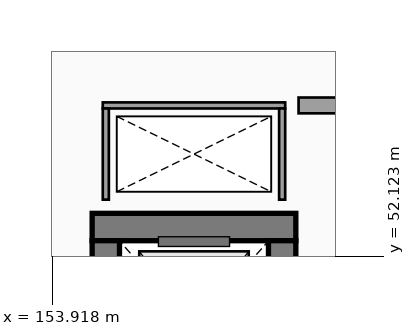
"""IFC4 building model, lengths in metres.
Left out: names, types, materials, properties, quantities, classifications, styles, units other than length and angle.
Written with IfcOpenShell. Run it as: python <this file> out.ifc"""

import sys

from ifc_helpers import new_model, si_unit, direction, frame, frame_2d, origin, place, context, subcontext, project, spatial, rectangle, extrude, element, save


model = new_model("IFC4")
c1 = context("Model", 3, precision=1e-05, world=origin(), true_north=direction((0.0, 1.0)))
c2 = subcontext(c1, "Body", "Model", "MODEL_VIEW")
j1 = project(units=[si_unit("LENGTHUNIT", "METRE"), si_unit("PLANEANGLEUNIT", "RADIAN")], contexts=[c1])
p1 = place(None, origin())
s1 = spatial("IfcSite", under=j1, at=p1, CompositionType="ELEMENT")
p2 = place(p1, origin())
s2 = spatial("IfcBuilding", under=s1, at=p2, CompositionType="ELEMENT")
p3 = place(p2, frame((0.0, 0.0, 9.6)))
s3 = spatial("IfcBuildingStorey", under=s2, at=p3, CompositionType="ELEMENT", Elevation=9.6)
p4 = place(p3, frame((157.925, 52.6, 0.0), z_axis=(0.0, 0.0, 1.0), x_axis=(-1.0, 0.0, 0.0)))
e1 = element("IfcWall", 1, at=p4, inside=s3, PredefinedType="SHEAR", context=c2, shape_type="SweptSolid", body=[
    extrude(rectangle(XDim=3.35, YDim=0.45, at=frame_2d((1.675, 0.0))), origin(), (0.0, 0.0, 1.0), 4.22),
])
p5 = place(p3, frame((154.8, 52.375, 0.0), z_axis=(0.0, 0.0, 1.0), x_axis=(0.0, -1.0, 0.0)))
e2 = element("IfcWall", 2, at=p5, inside=s3, PredefinedType="SHEAR", context=c2, shape_type="SweptSolid", body=[
    extrude(rectangle(XDim=2.75, YDim=0.45, at=frame_2d((1.375, 0.0))), origin(), (0.0, 0.0, 1.0), 4.22),
])
p6 = place(p3, frame((157.7, 49.625, 0.0), z_axis=(0.0, 0.0, 1.0), x_axis=(0.0, 1.0, 0.0)))
e3 = element("IfcWall", 3, at=p6, inside=s3, PredefinedType="SHEAR", context=c2, shape_type="SweptSolid", body=[
    extrude(rectangle(XDim=2.75, YDim=0.45, at=frame_2d((1.375, 0.0))), origin(), (0.0, 0.0, 1.0), 4.22),
])
p7 = place(p6, frame((0.725, 0.0, 0.0), z_axis=(0.0, 0.0, 1.0), x_axis=(1.0, 0.0, 0.0)))
e4 = element("IfcOpeningElement", 4, at=p7, cuts=e3, PredefinedType="OPENING", context=c2, shape_type="SweptSolid", body=[
    extrude(rectangle(XDim=1.3, YDim=2.25, at=frame_2d((0.65, 1.125))), frame((0.0, 0.235, 0.0), z_axis=(0.0, -1.0, 0.0), x_axis=(1.0, 0.0, 0.0)), (0.0, 0.0, 1.0), 0.47),
])
p8 = place(p3, frame((157.75, 54.6, 0.0), z_axis=(0.0, 0.0, 1.0), x_axis=(-1.0, 0.0, 0.0)))
e5 = element("IfcWall", 5, at=p8, inside=s3, PredefinedType="PARTITIONING", context=c2, shape_type="SweptSolid", body=[
    extrude(rectangle(XDim=3.0, YDim=0.1, at=frame_2d((1.5, 0.0))), origin(), (0.0, 0.0, 1.0), 4.22),
])
for number, where, z_axis, x_axis in (
    (6, (154.8, 54.55, 0.0), (0.0, 0.0, 1.0), (0.0, -1.0, 0.0)),
    (7, (157.7, 53.05, 0.0), (0.0, 0.0, 1.0), (0.0, 1.0, 0.0)),
):
    element("IfcWall", number, at=place(p3, frame(where, z_axis=z_axis, x_axis=x_axis)), inside=s3, PredefinedType="PARTITIONING", context=c2, shape_type="SweptSolid", body=[
        extrude(rectangle(XDim=1.5, YDim=0.1, at=frame_2d((0.75, 0.0))), origin(), (0.0, 0.0, 1.0), 4.22),
    ])
p9 = place(p3, frame((161.73, 54.6, 0.0), z_axis=(0.0, 0.0, 1.0), x_axis=(-1.0, 0.0, 0.0)))
e8 = element("IfcWall", 8, at=p9, inside=s3, PredefinedType="SOLIDWALL", context=c2, shape_type="SweptSolid", body=[
    extrude(rectangle(XDim=3.76, YDim=0.26, at=frame_2d((1.88, 0.0))), origin(), (0.0, 0.0, 1.0), 4.22),
])
p10 = place(p9, frame((2.805, 0.0, 0.0), z_axis=(0.0, 0.0, 1.0), x_axis=(-1.0, 0.0, 0.0)))
e9 = element("IfcOpeningElement", 9, at=p10, cuts=e8, PredefinedType="OPENING", context=c2, shape_type="SweptSolid", body=[
    extrude(rectangle(XDim=1.85, YDim=2.25, at=frame_2d((0.925, 1.125))), frame((0.0, 0.14, 0.0), z_axis=(0.0, -1.0, 0.0), x_axis=(1.0, 0.0, 0.0)), (0.0, 0.0, 1.0), 0.28),
])
save(model, sys.argv[1])
